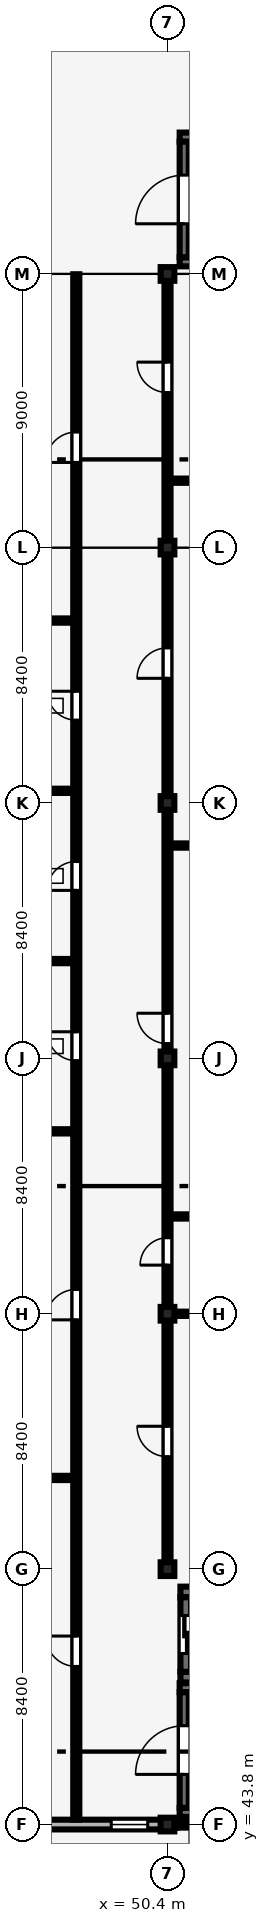
"""IFC4 building model, lengths in metres.
Left out: names, types, materials, properties, quantities, classifications, styles, units other than length and angle.
Written with IfcOpenShell. Run it as: python <this file> out.ifc"""

import sys

from ifc_helpers import new_model, si_unit, direction, frame, frame_2d, origin, origin_2d, place, context, subcontext, project, spatial, rectangle, extrude, element, fill, save


model = new_model("IFC4")
c1 = context("Model", 3, precision=1e-05, world=origin(), true_north=direction((0.0, 1.0)))
c2 = subcontext(c1, "Body", "Model", "MODEL_VIEW")
j1 = project(units=[si_unit("LENGTHUNIT", "METRE"), si_unit("PLANEANGLEUNIT", "RADIAN")], contexts=[c1])
p1 = place(None, origin())
s1 = spatial("IfcSite", under=j1, at=p1, CompositionType="ELEMENT")
p2 = place(p1, origin())
s2 = spatial("IfcBuilding", under=s1, at=p2, CompositionType="ELEMENT")
p3 = place(p2, frame((0.0, 0.0, 17.4)))
s3 = spatial("IfcBuildingStorey", under=s2, at=p3, CompositionType="ELEMENT", Elevation=17.4)
for number, where, z_axis, x_axis in (
    (1, (50.4, 43.8, 0.0), (0.0, 0.0, 1.0), (1.0, 0.0, 0.0)),
    (2, (50.4, 52.2, 0.0), (0.0, 0.0, 1.0), (1.0, 0.0, 0.0)),
    (3, (50.4, 60.6, 0.0), (0.0, 0.0, 1.0), (1.0, 0.0, 0.0)),
    (4, (50.4, 69.0, 0.0), (0.0, 0.0, 1.0), (1.0, 0.0, 0.0)),
    (5, (50.4, 77.4, 0.0), (0.0, 0.0, 1.0), (1.0, 0.0, 0.0)),
    (6, (50.4, 85.8, 0.0), (0.0, 0.0, 1.0), (1.0, 0.0, 0.0)),
    (7, (50.4, 94.8, 0.0), (0.0, 0.0, 1.0), (1.0, 0.0, 0.0)),
):
    element("IfcColumn", number, at=place(p3, frame(where, z_axis=z_axis, x_axis=x_axis)), inside=s3, PredefinedType="COLUMN", context=c2, shape_type="SweptSolid", body=[
        extrude(rectangle(XDim=0.45, YDim=0.45, at=origin_2d()), origin(), (0.0, 0.0, 1.0), 4.2),
    ])
p4 = place(p3, frame((42.2, 43.8, 0.0), z_axis=(0.0, 0.0, 1.0), x_axis=(1.0, 0.0, 0.0)))
e8 = element("IfcWall", 8, at=p4, inside=s3, PredefinedType="SOLIDWALL", context=c2, shape_type="SweptSolid", body=[
    extrude(rectangle(XDim=8.0, YDim=0.32, at=frame_2d((4.0, 0.0))), origin(), (0.0, 0.0, 1.0), 3.29),
])
p5 = place(p4, frame((0.45, 0.0, 0.9)))
e9 = element("IfcOpeningElement", 9, at=p5, cuts=e8, PredefinedType="OPENING", context=c2, shape_type="SweptSolid", body=[
    extrude(rectangle(XDim=1.2, YDim=1.5, at=frame_2d((0.6, 0.75))), frame((0.0, 0.17, 0.0), z_axis=(0.0, -1.0, 0.0), x_axis=(1.0, 0.0, 0.0)), (0.0, 0.0, 1.0), 0.34),
])
p6 = place(p4, frame((6.35, 0.0, 0.9)))
e10 = element("IfcOpeningElement", 10, at=p6, cuts=e8, PredefinedType="OPENING", context=c2, shape_type="SweptSolid", body=[
    extrude(rectangle(XDim=1.2, YDim=1.8, at=frame_2d((0.6, 0.9))), frame((0.0, 0.17, 0.0), z_axis=(0.0, -1.0, 0.0), x_axis=(1.0, 0.0, 0.0)), (0.0, 0.0, 1.0), 0.34),
])
for number, where, z_axis, x_axis in (
    (11, (50.8, 44.2, 0.0), (0.0, 0.0, 1.0), (1.0, 0.0, 0.0)),
    (12, (50.8, 48.3, 0.0), (0.0, 0.0, 1.0), (1.0, 0.0, 0.0)),
):
    element("IfcWall", number, at=place(p3, frame(where, z_axis=z_axis, x_axis=x_axis)), inside=s3, PredefinedType="SHEAR", context=c2, shape_type="SweptSolid", body=[
        extrude(rectangle(XDim=7.6, YDim=0.3, at=frame_2d((3.8, 0.0))), origin(), (0.0, 0.0, 1.0), 4.025),
    ])
p7 = place(p3, frame((50.95, 44.35, 0.0), z_axis=(0.0, 0.0, 1.0), x_axis=(0.0, 1.0, 0.0)))
e13 = element("IfcWall", 13, at=p7, inside=s3, PredefinedType="SHEAR", context=c2, shape_type="SweptSolid", body=[
    extrude(rectangle(XDim=3.8, YDim=0.3, at=frame_2d((1.9, 0.0))), origin(), (0.0, 0.0, 1.0), 4.025),
])
p8 = place(p7, frame((1.1, 0.0, 0.0)))
e14 = element("IfcOpeningElement", 14, at=p8, cuts=e13, PredefinedType="OPENING", context=c2, shape_type="SweptSolid", body=[
    extrude(rectangle(XDim=1.6, YDim=2.2, at=frame_2d((0.8, 1.1))), frame((0.0, 0.16, 0.0), z_axis=(0.0, -1.0, 0.0), x_axis=(1.0, 0.0, 0.0)), (0.0, 0.0, 1.0), 0.32),
])
for number, where, z_axis, x_axis in (
    (15, (50.825, 48.65, 0.0), (0.0, 0.0, 1.0), (1.0, 0.0, 0.0)),
    (16, (50.825, 51.45, 0.0), (0.0, 0.0, 1.0), (1.0, 0.0, 0.0)),
):
    element("IfcWall", number, at=place(p3, frame(where, z_axis=z_axis, x_axis=x_axis)), inside=s3, PredefinedType="SHEAR", context=c2, shape_type="SweptSolid", body=[
        extrude(rectangle(XDim=3.55, YDim=0.35, at=frame_2d((1.775, 0.0))), origin(), (0.0, 0.0, 1.0), 3.92),
    ])
p9 = place(p3, frame((51.0, 48.825, 0.0), z_axis=(0.0, 0.0, 1.0), x_axis=(0.0, 1.0, 0.0)))
e17 = element("IfcWall", 17, at=p9, inside=s3, PredefinedType="SHEAR", context=c2, shape_type="SweptSolid", body=[
    extrude(rectangle(XDim=2.45, YDim=0.35, at=frame_2d((1.225, 0.0))), origin(), (0.0, 0.0, 1.0), 3.92),
])
p10 = place(p9, frame((0.6, 0.0, 0.0)))
e18 = element("IfcOpeningElement", 18, at=p10, cuts=e17, PredefinedType="OPENING", context=c2, shape_type="SweptSolid", body=[
    extrude(rectangle(XDim=1.25, YDim=2.25, at=frame_2d((0.625, 1.125))), frame((0.0, 0.185, 0.0), z_axis=(0.0, -1.0, 0.0), x_axis=(1.0, 0.0, 0.0)), (0.0, 0.0, 1.0), 0.37),
])
for number, where, z_axis, x_axis in (
    (19, (50.8, 95.2, 0.0), (0.0, 0.0, 1.0), (1.0, 0.0, 0.0)),
    (20, (50.8, 99.3, 0.0), (0.0, 0.0, 1.0), (1.0, 0.0, 0.0)),
):
    element("IfcWall", number, at=place(p3, frame(where, z_axis=z_axis, x_axis=x_axis)), inside=s3, PredefinedType="SHEAR", context=c2, shape_type="SweptSolid", body=[
        extrude(rectangle(XDim=7.6, YDim=0.3, at=frame_2d((3.8, 0.0))), origin(), (0.0, 0.0, 1.0), 4.025),
    ])
p11 = place(p3, frame((50.95, 95.35, 0.0), z_axis=(0.0, 0.0, 1.0), x_axis=(0.0, 1.0, 0.0)))
e21 = element("IfcWall", 21, at=p11, inside=s3, PredefinedType="SHEAR", context=c2, shape_type="SweptSolid", body=[
    extrude(rectangle(XDim=3.8, YDim=0.3, at=frame_2d((1.9, 0.0))), origin(), (0.0, 0.0, 1.0), 4.025),
])
p12 = place(p11, frame((1.1, 0.0, 0.0)))
e22 = element("IfcOpeningElement", 22, at=p12, cuts=e21, PredefinedType="OPENING", context=c2, shape_type="SweptSolid", body=[
    extrude(rectangle(XDim=1.6, YDim=2.2, at=frame_2d((0.8, 1.1))), frame((0.0, 0.16, 0.0), z_axis=(0.0, -1.0, 0.0), x_axis=(1.0, 0.0, 0.0)), (0.0, 0.0, 1.0), 0.32),
])
p13 = place(p3, frame((42.165, 55.2, 0.0), z_axis=(0.0, 0.0, 1.0), x_axis=(1.0, 0.0, 0.0)))
e23 = element("IfcWall", 23, at=p13, inside=s3, PredefinedType="PARTITIONING", context=c2, shape_type="SweptSolid", body=[
    extrude(rectangle(XDim=5.13, YDim=0.14, at=frame_2d((2.565, 0.0))), origin(), (0.0, 0.0, 1.0), 3.49),
])
p14 = place(p3, frame((42.195, 66.6, 0.0), z_axis=(0.0, 0.0, 1.0), x_axis=(1.0, 0.0, 0.0)))
e24 = element("IfcWall", 24, at=p14, inside=s3, PredefinedType="PARTITIONING", context=c2, shape_type="SweptSolid", body=[
    extrude(rectangle(XDim=5.1, YDim=0.14, at=frame_2d((2.55, 0.0))), origin(), (0.0, 0.0, 1.0), 3.49),
])
p15 = place(p3, frame((42.195, 72.2, 0.0), z_axis=(0.0, 0.0, 1.0), x_axis=(1.0, 0.0, 0.0)))
e25 = element("IfcWall", 25, at=p15, inside=s3, PredefinedType="PARTITIONING", context=c2, shape_type="SweptSolid", body=[
    extrude(rectangle(XDim=5.1, YDim=0.14, at=frame_2d((2.55, 0.0))), origin(), (0.0, 0.0, 1.0), 3.9),
])
p16 = place(p3, frame((42.195, 77.8, 0.0), z_axis=(0.0, 0.0, 1.0), x_axis=(1.0, 0.0, 0.0)))
e26 = element("IfcWall", 26, at=p16, inside=s3, PredefinedType="PARTITIONING", context=c2, shape_type="SweptSolid", body=[
    extrude(rectangle(XDim=5.1, YDim=0.14, at=frame_2d((2.55, 0.0))), origin(), (0.0, 0.0, 1.0), 3.19),
])
p17 = place(p3, frame((42.195, 83.4, 0.0), z_axis=(0.0, 0.0, 1.0), x_axis=(1.0, 0.0, 0.0)))
e27 = element("IfcWall", 27, at=p17, inside=s3, PredefinedType="PARTITIONING", context=c2, shape_type="SweptSolid", body=[
    extrude(rectangle(XDim=5.1, YDim=0.14, at=frame_2d((2.55, 0.0))), origin(), (0.0, 0.0, 1.0), 3.9),
])
p18 = place(p3, frame((47.4, 43.965, 0.0), z_axis=(0.0, 0.0, 1.0), x_axis=(0.0, 1.0, 0.0)))
e28 = element("IfcWall", 28, at=p18, inside=s3, PredefinedType="PARTITIONING", context=c2, shape_type="SweptSolid", body=[
    extrude(rectangle(XDim=50.825, YDim=0.2, at=frame_2d((25.413, 0.0))), origin(), (0.0, 0.0, 1.0), 3.9),
])
p19 = place(p18, frame((5.035, 0.0, 0.0)))
e29 = element("IfcOpeningElement", 29, at=p19, cuts=e28, PredefinedType="OPENING", context=c2, shape_type="SweptSolid", body=[
    extrude(rectangle(XDim=1.0, YDim=2.15, at=frame_2d((0.5, 1.075))), frame((0.0, 0.11, 0.0), z_axis=(0.0, -1.0, 0.0), x_axis=(1.0, 0.0, 0.0)), (0.0, 0.0, 1.0), 0.22),
])
p20 = place(p18, frame((16.435, 0.0, 0.0)))
e30 = element("IfcOpeningElement", 30, at=p20, cuts=e28, PredefinedType="OPENING", context=c2, shape_type="SweptSolid", body=[
    extrude(rectangle(XDim=1.0, YDim=2.15, at=frame_2d((0.5, 1.075))), frame((0.0, 0.11, 0.0), z_axis=(0.0, -1.0, 0.0), x_axis=(1.0, 0.0, 0.0)), (0.0, 0.0, 1.0), 0.22),
])
p21 = place(p18, frame((24.96, 0.0, 0.0)))
e31 = element("IfcOpeningElement", 31, at=p21, cuts=e28, PredefinedType="OPENING", context=c2, shape_type="SweptSolid", body=[
    extrude(rectangle(XDim=0.95, YDim=2.2, at=frame_2d((0.475, 1.1))), frame((0.0, 0.11, 0.0), z_axis=(0.0, -1.0, 0.0), x_axis=(1.0, 0.0, 0.0)), (0.0, 0.0, 1.0), 0.22),
])
p22 = place(p18, frame((30.56, 0.0, 0.0)))
e32 = element("IfcOpeningElement", 32, at=p22, cuts=e28, PredefinedType="OPENING", context=c2, shape_type="SweptSolid", body=[
    extrude(rectangle(XDim=0.95, YDim=2.2, at=frame_2d((0.475, 1.1))), frame((0.0, 0.11, 0.0), z_axis=(0.0, -1.0, 0.0), x_axis=(1.0, 0.0, 0.0)), (0.0, 0.0, 1.0), 0.22),
])
p23 = place(p18, frame((36.16, 0.0, 0.0)))
e33 = element("IfcOpeningElement", 33, at=p23, cuts=e28, PredefinedType="OPENING", context=c2, shape_type="SweptSolid", body=[
    extrude(rectangle(XDim=0.95, YDim=2.1, at=frame_2d((0.475, 1.05))), frame((0.0, 0.11, 0.0), z_axis=(0.0, -1.0, 0.0), x_axis=(1.0, 0.0, 0.0)), (0.0, 0.0, 1.0), 0.22),
])
p24 = place(p18, frame((44.635, 0.0, 0.0)))
e34 = element("IfcOpeningElement", 34, at=p24, cuts=e28, PredefinedType="OPENING", context=c2, shape_type="SweptSolid", body=[
    extrude(rectangle(XDim=1.0, YDim=2.15, at=frame_2d((0.5, 1.075))), frame((0.0, 0.11, 0.0), z_axis=(0.0, -1.0, 0.0), x_axis=(1.0, 0.0, 0.0)), (0.0, 0.0, 1.0), 0.22),
])
p25 = place(p3, frame((50.505, 60.6, 0.0), z_axis=(0.0, 0.0, 1.0), x_axis=(1.0, 0.0, 0.0)))
e35 = element("IfcWall", 35, at=p25, inside=s3, PredefinedType="PARTITIONING", context=c2, shape_type="SweptSolid", body=[
    extrude(rectangle(XDim=8.06, YDim=0.14, at=frame_2d((4.03, 0.0))), origin(), (0.0, 0.0, 1.0), 2.94),
])
p26 = place(p3, frame((50.505, 63.8, 0.0), z_axis=(0.0, 0.0, 1.0), x_axis=(1.0, 0.0, 0.0)))
e36 = element("IfcWall", 36, at=p26, inside=s3, PredefinedType="PARTITIONING", context=c2, shape_type="SweptSolid", body=[
    extrude(rectangle(XDim=16.57, YDim=0.14, at=frame_2d((8.285, 0.0))), origin(), (0.0, 0.0, 1.0), 3.451),
])
p27 = place(p3, frame((50.505, 76.0, 0.0), z_axis=(0.0, 0.0, 1.0), x_axis=(1.0, 0.0, 0.0)))
e37 = element("IfcWall", 37, at=p27, inside=s3, PredefinedType="PARTITIONING", context=c2, shape_type="SweptSolid", body=[
    extrude(rectangle(XDim=16.57, YDim=0.14, at=frame_2d((8.285, 0.0))), origin(), (0.0, 0.0, 1.0), 3.9),
])
p28 = place(p3, frame((50.505, 88.0, 0.0), z_axis=(0.0, 0.0, 1.0), x_axis=(1.0, 0.0, 0.0)))
e38 = element("IfcWall", 38, at=p28, inside=s3, PredefinedType="PARTITIONING", context=c2, shape_type="SweptSolid", body=[
    extrude(rectangle(XDim=16.53, YDim=0.14, at=frame_2d((8.265, 0.0))), origin(), (0.0, 0.0, 1.0), 3.9),
])
p29 = place(p3, frame((50.4, 52.435, 0.0), z_axis=(0.0, 0.0, 1.0), x_axis=(0.0, 1.0, 0.0)))
e39 = element("IfcWall", 39, at=p29, inside=s3, PredefinedType="PARTITIONING", context=c2, shape_type="SweptSolid", body=[
    extrude(rectangle(XDim=7.93, YDim=0.2, at=frame_2d((3.965, 0.0))), origin(), (0.0, 0.0, 1.0), 3.14),
])
p30 = place(p29, frame((3.465, 0.0, 0.0)))
e40 = element("IfcOpeningElement", 40, at=p30, cuts=e39, PredefinedType="OPENING", context=c2, shape_type="SweptSolid", body=[
    extrude(rectangle(XDim=1.0, YDim=2.15, at=frame_2d((0.5, 1.075))), frame((0.0, 0.11, 0.0), z_axis=(0.0, -1.0, 0.0), x_axis=(1.0, 0.0, 0.0)), (0.0, 0.0, 1.0), 0.22),
])
p31 = place(p3, frame((50.4, 60.835, 0.0), z_axis=(0.0, 0.0, 1.0), x_axis=(0.0, 1.0, 0.0)))
e41 = element("IfcWall", 41, at=p31, inside=s3, PredefinedType="PARTITIONING", context=c2, shape_type="SweptSolid", body=[
    extrude(rectangle(XDim=7.93, YDim=0.2, at=frame_2d((3.965, 0.0))), origin(), (0.0, 0.0, 1.0), 3.09),
])
p32 = place(p31, frame((1.365, 0.0, 0.0)))
e42 = element("IfcOpeningElement", 42, at=p32, cuts=e41, PredefinedType="OPENING", context=c2, shape_type="SweptSolid", body=[
    extrude(rectangle(XDim=0.9, YDim=2.1, at=frame_2d((0.45, 1.05))), frame((0.0, 0.11, 0.0), z_axis=(0.0, -1.0, 0.0), x_axis=(1.0, 0.0, 0.0)), (0.0, 0.0, 1.0), 0.22),
])
p33 = place(p3, frame((50.4, 69.235, 0.0), z_axis=(0.0, 0.0, 1.0), x_axis=(0.0, 1.0, 0.0)))
e43 = element("IfcWall", 43, at=p33, inside=s3, PredefinedType="PARTITIONING", context=c2, shape_type="SweptSolid", body=[
    extrude(rectangle(XDim=7.93, YDim=0.2, at=frame_2d((3.965, 0.0))), origin(), (0.0, 0.0, 1.0), 3.09),
])
p34 = place(p33, frame((0.25, 0.0, 0.0)))
e44 = element("IfcOpeningElement", 44, at=p34, cuts=e43, PredefinedType="OPENING", context=c2, shape_type="SweptSolid", body=[
    extrude(rectangle(XDim=1.0, YDim=2.15, at=frame_2d((0.5, 1.075))), frame((0.0, 0.11, 0.0), z_axis=(0.0, -1.0, 0.0), x_axis=(1.0, 0.0, 0.0)), (0.0, 0.0, 1.0), 0.22),
])
p35 = place(p3, frame((50.4, 77.635, 0.0), z_axis=(0.0, 0.0, 1.0), x_axis=(0.0, 1.0, 0.0)))
e45 = element("IfcWall", 45, at=p35, inside=s3, PredefinedType="PARTITIONING", context=c2, shape_type="SweptSolid", body=[
    extrude(rectangle(XDim=7.93, YDim=0.2, at=frame_2d((3.965, 0.0))), origin(), (0.0, 0.0, 1.0), 3.04),
])
p36 = place(p35, frame((3.865, 0.0, 0.0)))
e46 = element("IfcOpeningElement", 46, at=p36, cuts=e45, PredefinedType="OPENING", context=c2, shape_type="SweptSolid", body=[
    extrude(rectangle(XDim=1.0, YDim=2.15, at=frame_2d((0.5, 1.075))), frame((0.0, 0.11, 0.0), z_axis=(0.0, -1.0, 0.0), x_axis=(1.0, 0.0, 0.0)), (0.0, 0.0, 1.0), 0.22),
])
p37 = place(p3, frame((50.4, 86.035, 0.0), z_axis=(0.0, 0.0, 1.0), x_axis=(0.0, 1.0, 0.0)))
e47 = element("IfcWall", 47, at=p37, inside=s3, PredefinedType="PARTITIONING", context=c2, shape_type="SweptSolid", body=[
    extrude(rectangle(XDim=8.53, YDim=0.2, at=frame_2d((4.265, 0.0))), origin(), (0.0, 0.0, 1.0), 2.99),
])
p38 = place(p37, frame((4.865, 0.0, 0.0)))
e48 = element("IfcOpeningElement", 48, at=p38, cuts=e47, PredefinedType="OPENING", context=c2, shape_type="SweptSolid", body=[
    extrude(rectangle(XDim=1.0, YDim=2.15, at=frame_2d((0.5, 1.075))), frame((0.0, 0.11, 0.0), z_axis=(0.0, -1.0, 0.0), x_axis=(1.0, 0.0, 0.0)), (0.0, 0.0, 1.0), 0.22),
])
p39 = place(p6, origin())
e49 = element("IfcWindow", 49, at=p39, inside=s3, PartitioningType="SINGLE_PANEL", PredefinedType="WINDOW", context=c2, shape_type="SweptSolid", body=[
    extrude(rectangle(XDim=1.2, YDim=1.8, at=frame_2d((0.6, 0.9))), frame((0.0, 0.03, 0.0), z_axis=(0.0, -1.0, 0.0), x_axis=(1.0, 0.0, 0.0)), (0.0, 0.0, 1.0), 0.06),
])
fill(e10, e49)
p40 = place(p8, origin())
e50 = element("IfcDoor", 50, at=p40, inside=s3, OperationType="DOUBLE_DOOR_SINGLE_SWING", PredefinedType="DOOR", context=c2, shape_type="SweptSolid", body=[
    extrude(rectangle(XDim=1.6, YDim=2.2, at=frame_2d((0.8, 1.1))), frame((0.0, 0.025, 0.0), z_axis=(0.0, -1.0, 0.0), x_axis=(1.0, 0.0, 0.0)), (0.0, 0.0, 1.0), 0.05),
])
fill(e14, e50)
p41 = place(p10, origin())
e51 = element("IfcDoor", 51, at=p41, inside=s3, OperationType="DOUBLE_DOOR_SLIDING", PredefinedType="DOOR", context=c2, shape_type="SweptSolid", body=[
    extrude(rectangle(XDim=1.25, YDim=2.25, at=frame_2d((0.625, 1.125))), frame((0.0, 0.025, 0.0), z_axis=(0.0, -1.0, 0.0), x_axis=(1.0, 0.0, 0.0)), (0.0, 0.0, 1.0), 0.05),
])
fill(e18, e51)
p42 = place(p12, origin())
e52 = element("IfcDoor", 52, at=p42, inside=s3, OperationType="DOUBLE_DOOR_SINGLE_SWING", PredefinedType="DOOR", context=c2, shape_type="SweptSolid", body=[
    extrude(rectangle(XDim=1.6, YDim=2.2, at=frame_2d((0.8, 1.1))), frame((0.0, 0.025, 0.0), z_axis=(0.0, -1.0, 0.0), x_axis=(1.0, 0.0, 0.0)), (0.0, 0.0, 1.0), 0.05),
])
fill(e22, e52)
p43 = place(p19, origin())
e53 = element("IfcDoor", 53, at=p43, inside=s3, OperationType="SINGLE_SWING_RIGHT", PredefinedType="DOOR", context=c2, shape_type="SweptSolid", body=[
    extrude(rectangle(XDim=1.0, YDim=2.15, at=frame_2d((0.5, 1.075))), frame((0.0, 0.025, 0.0), z_axis=(0.0, -1.0, 0.0), x_axis=(1.0, 0.0, 0.0)), (0.0, 0.0, 1.0), 0.05),
])
fill(e29, e53)
p44 = place(p20, origin())
e54 = element("IfcDoor", 54, at=p44, inside=s3, OperationType="SINGLE_SWING_LEFT", PredefinedType="DOOR", context=c2, shape_type="SweptSolid", body=[
    extrude(rectangle(XDim=1.0, YDim=2.15, at=frame_2d((0.5, 1.075))), frame((0.0, 0.025, 0.0), z_axis=(0.0, -1.0, 0.0), x_axis=(1.0, 0.0, 0.0)), (0.0, 0.0, 1.0), 0.05),
])
fill(e30, e54)
p45 = place(p21, origin())
e55 = element("IfcDoor", 55, at=p45, inside=s3, OperationType="SINGLE_SWING_RIGHT", PredefinedType="DOOR", context=c2, shape_type="SweptSolid", body=[
    extrude(rectangle(XDim=0.95, YDim=2.2, at=frame_2d((0.475, 1.1))), frame((0.0, 0.025, 0.0), z_axis=(0.0, -1.0, 0.0), x_axis=(1.0, 0.0, 0.0)), (0.0, 0.0, 1.0), 0.05),
])
fill(e31, e55)
p46 = place(p22, origin())
e56 = element("IfcDoor", 56, at=p46, inside=s3, OperationType="SINGLE_SWING_LEFT", PredefinedType="DOOR", context=c2, shape_type="SweptSolid", body=[
    extrude(rectangle(XDim=0.95, YDim=2.2, at=frame_2d((0.475, 1.1))), frame((0.0, 0.025, 0.0), z_axis=(0.0, -1.0, 0.0), x_axis=(1.0, 0.0, 0.0)), (0.0, 0.0, 1.0), 0.05),
])
fill(e32, e56)
p47 = place(p23, origin())
e57 = element("IfcDoor", 57, at=p47, inside=s3, OperationType="SINGLE_SWING_RIGHT", PredefinedType="DOOR", context=c2, shape_type="SweptSolid", body=[
    extrude(rectangle(XDim=0.95, YDim=2.1, at=frame_2d((0.475, 1.05))), frame((0.0, 0.025, 0.0), z_axis=(0.0, -1.0, 0.0), x_axis=(1.0, 0.0, 0.0)), (0.0, 0.0, 1.0), 0.05),
])
fill(e33, e57)
p48 = place(p24, origin())
e58 = element("IfcDoor", 58, at=p48, inside=s3, OperationType="SINGLE_SWING_LEFT", PredefinedType="DOOR", context=c2, shape_type="SweptSolid", body=[
    extrude(rectangle(XDim=1.0, YDim=2.15, at=frame_2d((0.5, 1.075))), frame((0.0, 0.025, 0.0), z_axis=(0.0, -1.0, 0.0), x_axis=(1.0, 0.0, 0.0)), (0.0, 0.0, 1.0), 0.05),
])
fill(e34, e58)
p49 = place(p30, origin())
e59 = element("IfcDoor", 59, at=p49, inside=s3, OperationType="SINGLE_SWING_RIGHT", PredefinedType="DOOR", context=c2, shape_type="SweptSolid", body=[
    extrude(rectangle(XDim=1.0, YDim=2.15, at=frame_2d((0.5, 1.075))), frame((0.0, 0.025, 0.0), z_axis=(0.0, -1.0, 0.0), x_axis=(1.0, 0.0, 0.0)), (0.0, 0.0, 1.0), 0.05),
])
fill(e40, e59)
p50 = place(p32, origin())
e60 = element("IfcDoor", 60, at=p50, inside=s3, OperationType="SINGLE_SWING_LEFT", PredefinedType="DOOR", context=c2, shape_type="SweptSolid", body=[
    extrude(rectangle(XDim=0.9, YDim=2.1, at=frame_2d((0.45, 1.05))), frame((0.0, 0.025, 0.0), z_axis=(0.0, -1.0, 0.0), x_axis=(1.0, 0.0, 0.0)), (0.0, 0.0, 1.0), 0.05),
])
fill(e42, e60)
p51 = place(p34, origin())
e61 = element("IfcDoor", 61, at=p51, inside=s3, OperationType="SINGLE_SWING_RIGHT", PredefinedType="DOOR", context=c2, shape_type="SweptSolid", body=[
    extrude(rectangle(XDim=1.0, YDim=2.15, at=frame_2d((0.5, 1.075))), frame((0.0, 0.025, 0.0), z_axis=(0.0, -1.0, 0.0), x_axis=(1.0, 0.0, 0.0)), (0.0, 0.0, 1.0), 0.05),
])
fill(e44, e61)
p52 = place(p36, origin())
e62 = element("IfcDoor", 62, at=p52, inside=s3, OperationType="SINGLE_SWING_LEFT", PredefinedType="DOOR", context=c2, shape_type="SweptSolid", body=[
    extrude(rectangle(XDim=1.0, YDim=2.15, at=frame_2d((0.5, 1.075))), frame((0.0, 0.025, 0.0), z_axis=(0.0, -1.0, 0.0), x_axis=(1.0, 0.0, 0.0)), (0.0, 0.0, 1.0), 0.05),
])
fill(e46, e62)
p53 = place(p38, origin())
e63 = element("IfcDoor", 63, at=p53, inside=s3, OperationType="SINGLE_SWING_RIGHT", PredefinedType="DOOR", context=c2, shape_type="SweptSolid", body=[
    extrude(rectangle(XDim=1.0, YDim=2.15, at=frame_2d((0.5, 1.075))), frame((0.0, 0.025, 0.0), z_axis=(0.0, -1.0, 0.0), x_axis=(1.0, 0.0, 0.0)), (0.0, 0.0, 1.0), 0.05),
])
fill(e48, e63)
save(model, sys.argv[1])
